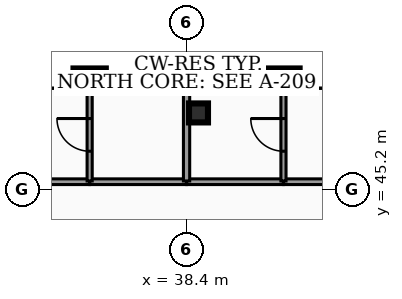
"""IFC4 building model, lengths in metres.
Left out: names, types, materials, properties, quantities, classifications, styles, units other than length and angle.
Written with IfcOpenShell. Run it as: python <this file> out.ifc"""

import sys

from ifc_helpers import new_model, si_unit, direction, frame, frame_2d, origin, origin_2d, place, context, subcontext, project, spatial, rectangle, hollow_rectangle, extrude, element, fill, save


model = new_model("IFC4")
c1 = context("Model", 3, precision=1e-05, world=origin(), true_north=direction((0.0, 1.0)))
c2 = subcontext(c1, "Body", "Model", "MODEL_VIEW")
j1 = project(units=[si_unit("LENGTHUNIT", "METRE"), si_unit("PLANEANGLEUNIT", "RADIAN")], contexts=[c1])
p1 = place(None, origin())
s1 = spatial("IfcSite", under=j1, at=p1, CompositionType="ELEMENT")
p2 = place(p1, origin())
s2 = spatial("IfcBuilding", under=s1, at=p2, CompositionType="ELEMENT")
p3 = place(p2, frame((0.0, 0.0, 261.8)))
s3 = spatial("IfcBuildingStorey", under=s2, at=p3, CompositionType="ELEMENT", Elevation=261.8)
p4 = place(p3, frame((38.714, 47.217, 0.0), z_axis=(0.0, 0.0, 1.0), x_axis=(1.0, 0.0, 0.0)))
e1 = element("IfcColumn", 1, at=p4, inside=s3, PredefinedType="COLUMN", context=c2, shape_type="SweptSolid", body=[
    extrude(hollow_rectangle(XDim=0.5, YDim=0.5, WallThickness=0.025, at=origin_2d()), origin(), (0.0, 0.0, 1.0), 3.18),
])
p5 = place(p3, frame((26.57, 45.407, 0.0), z_axis=(0.0, 0.0, 1.0), x_axis=(1.0, 0.0, 0.0)))
e2 = element("IfcWall", 2, at=p5, inside=s3, PredefinedType="PARTITIONING", context=c2, shape_type="SweptSolid", body=[
    extrude(rectangle(XDim=9.275, YDim=0.15, at=frame_2d((4.637, 0.0))), origin(), (0.0, 0.0, 1.0), 2.235),
])
p6 = place(p3, frame((35.855, 45.407, 0.0), z_axis=(0.0, 0.0, 1.0), x_axis=(1.0, 0.0, 0.0)))
e3 = element("IfcWall", 3, at=p6, inside=s3, PredefinedType="PARTITIONING", context=c2, shape_type="SweptSolid", body=[
    extrude(rectangle(XDim=2.54, YDim=0.15, at=frame_2d((1.27, 0.0))), origin(), (0.0, 0.0, 1.0), 2.235),
])
p7 = place(p3, frame((40.955, 45.407, 0.0), z_axis=(0.0, 0.0, 1.0), x_axis=(1.0, 0.0, 0.0)))
e4 = element("IfcWall", 4, at=p7, inside=s3, PredefinedType="PARTITIONING", context=c2, shape_type="SweptSolid", body=[
    extrude(rectangle(XDim=9.375, YDim=0.15, at=frame_2d((4.688, 0.0))), origin(), (0.0, 0.0, 1.0), 2.235),
])
p8 = place(p3, frame((38.405, 45.407, 0.0), z_axis=(0.0, 0.0, 1.0), x_axis=(1.0, 0.0, 0.0)))
e5 = element("IfcWall", 5, at=p8, inside=s3, PredefinedType="PARTITIONING", context=c2, shape_type="SweptSolid", body=[
    extrude(rectangle(XDim=2.54, YDim=0.15, at=frame_2d((1.27, 0.0))), origin(), (0.0, 0.0, 1.0), 2.235),
])
p9 = place(p3, frame((35.85, 45.427, 0.0), z_axis=(0.0, 0.0, 1.0), x_axis=(0.0, 1.0, 0.0)))
e6 = element("IfcWall", 6, at=p9, inside=s3, PredefinedType="PARTITIONING", context=c2, shape_type="SweptSolid", body=[
    extrude(rectangle(XDim=2.425, YDim=0.135, at=frame_2d((1.212, 0.0))), origin(), (0.0, 0.0, 1.0), 2.235),
])
p10 = place(p9, frame((0.782, 0.0, 0.0)))
e7 = element("IfcOpeningElement", 7, at=p10, cuts=e6, PredefinedType="OPENING", context=c2, shape_type="SweptSolid", body=[
    extrude(rectangle(XDim=0.86, YDim=2.05, at=frame_2d((0.43, 1.025))), frame((0.0, 0.077, 0.0), z_axis=(0.0, -1.0, 0.0), x_axis=(1.0, 0.0, 0.0)), (0.0, 0.0, 1.0), 0.155),
])
p11 = place(p3, frame((38.4, 45.427, 0.0), z_axis=(0.0, 0.0, 1.0), x_axis=(0.0, 1.0, 0.0)))
e8 = element("IfcWall", 8, at=p11, inside=s3, PredefinedType="PARTITIONING", context=c2, shape_type="SweptSolid", body=[
    extrude(rectangle(XDim=2.425, YDim=0.165, at=frame_2d((1.212, 0.0))), origin(), (0.0, 0.0, 1.0), 2.235),
])
p12 = place(p3, frame((40.95, 45.427, 0.0), z_axis=(0.0, 0.0, 1.0), x_axis=(0.0, 1.0, 0.0)))
e9 = element("IfcWall", 9, at=p12, inside=s3, PredefinedType="PARTITIONING", context=c2, shape_type="SweptSolid", body=[
    extrude(rectangle(XDim=2.425, YDim=0.135, at=frame_2d((1.212, 0.0))), origin(), (0.0, 0.0, 1.0), 2.235),
])
p13 = place(p12, frame((0.782, 0.0, 0.0)))
e10 = element("IfcOpeningElement", 10, at=p13, cuts=e9, PredefinedType="OPENING", context=c2, shape_type="SweptSolid", body=[
    extrude(rectangle(XDim=0.86, YDim=2.05, at=frame_2d((0.43, 1.025))), frame((0.0, 0.077, 0.0), z_axis=(0.0, -1.0, 0.0), x_axis=(1.0, 0.0, 0.0)), (0.0, 0.0, 1.0), 0.155),
])
p14 = place(p10, origin())
e11 = element("IfcDoor", 11, at=p14, inside=s3, OperationType="SINGLE_SWING_RIGHT", PredefinedType="DOOR", context=c2, shape_type="SweptSolid", body=[
    extrude(rectangle(XDim=0.86, YDim=2.05, at=frame_2d((0.43, 1.025))), frame((0.0, 0.025, 0.0), z_axis=(0.0, -1.0, 0.0), x_axis=(1.0, 0.0, 0.0)), (0.0, 0.0, 1.0), 0.05),
])
fill(e7, e11)
p15 = place(p13, origin())
e12 = element("IfcDoor", 12, at=p15, inside=s3, OperationType="SINGLE_SWING_RIGHT", PredefinedType="DOOR", context=c2, shape_type="SweptSolid", body=[
    extrude(rectangle(XDim=0.86, YDim=2.05, at=frame_2d((0.43, 1.025))), frame((0.0, 0.025, 0.0), z_axis=(0.0, -1.0, 0.0), x_axis=(1.0, 0.0, 0.0)), (0.0, 0.0, 1.0), 0.05),
])
fill(e10, e12)
save(model, sys.argv[1])
